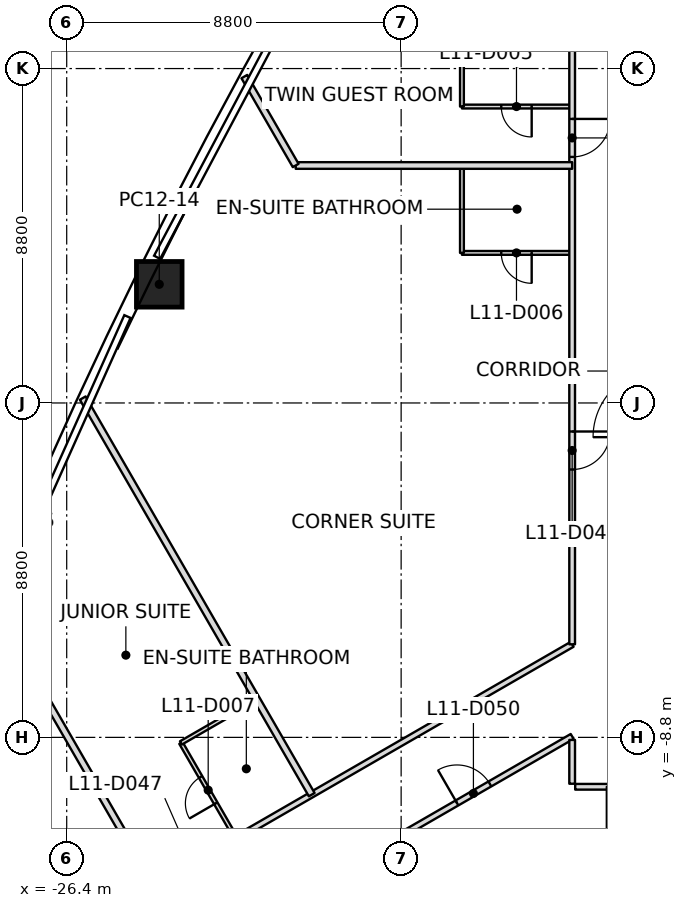
"""IFC4 building model, lengths in metres.
Left out: names, types, materials, properties, quantities, classifications, styles, units other than length and angle.
Written with IfcOpenShell. Run it as: python <this file> out.ifc"""

import sys

from ifc_helpers import new_model, si_unit, direction, frame, frame_2d, origin, origin_2d, place, context, subcontext, project, spatial, rectangle, extrude, element, fill, save


model = new_model("IFC4")
c1 = context("Model", 3, precision=1e-05, world=origin(), true_north=direction((0.0, 1.0)))
c2 = subcontext(c1, "Body", "Model", "MODEL_VIEW")
j1 = project(units=[si_unit("LENGTHUNIT", "METRE"), si_unit("PLANEANGLEUNIT", "RADIAN")], contexts=[c1])
p1 = place(None, origin())
s1 = spatial("IfcSite", under=j1, at=p1, CompositionType="ELEMENT")
p2 = place(p1, origin())
s2 = spatial("IfcBuilding", under=s1, at=p2, CompositionType="ELEMENT")
p3 = place(p2, frame((0.0, 0.0, 62.8)))
s3 = spatial("IfcBuildingStorey", under=s2, at=p3, CompositionType="ELEMENT", Elevation=62.8)
p4 = place(p3, frame((-23.965, 3.122, 0.0), z_axis=(0.015372606146, 0.002309189764, 0.999879168011), x_axis=(0.441716721862, 0.89711079847, -0.008863007202)))
e1 = element("IfcColumn", 1, at=p4, inside=s3, PredefinedType="COLUMN", context=c2, shape_type="SweptSolid", body=[
    extrude(rectangle(XDim=1.2, YDim=1.2, at=origin_2d()), origin(), (0.0, 0.0, 1.0), 3.7),
])
p5 = place(p3, frame((-24.11, -12.707, 0.0), z_axis=(0.0, 0.0, 1.0), x_axis=(-0.500004040168, 0.86602307118, 0.0)))
e2 = element("IfcWall", 2, at=p5, inside=s3, PredefinedType="PARTITIONING", context=c2, shape_type="SweptSolid", body=[
    extrude(rectangle(XDim=8.506, YDim=0.175, at=frame_2d((4.253, 0.0))), origin(), (0.0, 0.0, 1.0), 2.934),
])
p6 = place(p3, frame((-19.953, -10.307, 0.0), z_axis=(0.0, 0.0, 1.0), x_axis=(-0.500011246013, 0.866018910798, 0.0)))
e3 = element("IfcWall", 3, at=p6, inside=s3, PredefinedType="PARTITIONING", context=c2, shape_type="SweptSolid", body=[
    extrude(rectangle(XDim=12.05, YDim=0.175, at=frame_2d((6.025, 0.0))), origin(), (0.0, 0.0, 1.0), 2.934),
])
p7 = place(p3, frame((-13.1, 6.249, 0.0), z_axis=(0.0, 0.0, 1.0), x_axis=(-1.0, 0.0, 0.0)))
e4 = element("IfcWall", 4, at=p7, inside=s3, PredefinedType="PARTITIONING", context=c2, shape_type="SweptSolid", body=[
    extrude(rectangle(XDim=7.274, YDim=0.175, at=frame_2d((3.637, 0.0))), origin(), (0.0, 0.0, 1.0), 3.093),
])
p8 = place(p3, frame((-20.375, 6.249, 0.0), z_axis=(0.0, 0.0, 1.0), x_axis=(-0.50004574482, 0.86599899139, 0.0)))
e5 = element("IfcWall", 5, at=p8, inside=s3, PredefinedType="PARTITIONING", context=c2, shape_type="SweptSolid", body=[
    extrude(rectangle(XDim=2.702, YDim=0.175, at=frame_2d((1.351, 0.0))), origin(), (0.0, 0.0, 1.0), 2.934),
])
p9 = place(p3, frame((-12.1, -10.1, 0.0), z_axis=(0.0, 0.0, 1.0), x_axis=(0.0, -1.0, 0.0)))
e6 = element("IfcWall", 6, at=p9, inside=s3, PredefinedType="PARTITIONING", context=c2, shape_type="SweptSolid", body=[
    extrude(rectangle(XDim=7.608, YDim=0.175, at=frame_2d((3.804, 0.0))), origin(), (0.0, 0.0, 1.0), 3.15),
])
p10 = place(p3, frame((-13.1, -6.351, 0.0), z_axis=(0.0, 0.0, 1.0), x_axis=(-0.866022163861, -0.50000561167, 0.0)))
e7 = element("IfcWall", 7, at=p10, inside=s3, PredefinedType="PARTITIONING", context=c2, shape_type="SweptSolid", body=[
    extrude(rectangle(XDim=12.713, YDim=0.15, at=frame_2d((6.356, 0.0))), origin(), (0.0, 0.0, 1.0), 2.947),
])
p11 = place(p10, frame((11.013, 0.0, 0.0)))
e8 = element("IfcOpeningElement", 8, at=p11, cuts=e7, PredefinedType="OPENING", context=c2, shape_type="SweptSolid", body=[
    extrude(rectangle(XDim=1.0, YDim=2.1, at=frame_2d((0.5, 1.05))), frame((0.0, 0.075, 0.0), z_axis=(0.0, -1.0, 0.0), x_axis=(1.0, 0.0, 0.0)), (0.0, 0.0, 1.0), 0.15),
])
p12 = place(p3, frame((-22.99, -14.486, 0.0), z_axis=(0.0, 0.0, 1.0), x_axis=(0.866025744017, 0.499999410699, 0.0)))
e9 = element("IfcWall", 9, at=p12, inside=s3, PredefinedType="PARTITIONING", context=c2, shape_type="SweptSolid", body=[
    extrude(rectangle(XDim=11.42, YDim=0.15, at=frame_2d((5.71, 0.0))), origin(), (0.0, 0.0, 1.0), 2.797),
])
p13 = place(p12, frame((0.96, 0.0, 0.0)))
e10 = element("IfcOpeningElement", 10, at=p13, cuts=e9, PredefinedType="OPENING", context=c2, shape_type="SweptSolid", body=[
    extrude(rectangle(XDim=1.0, YDim=2.1, at=frame_2d((0.5, 1.05))), frame((0.0, 0.075, 0.0), z_axis=(0.0, -1.0, 0.0), x_axis=(1.0, 0.0, 0.0)), (0.0, 0.0, 1.0), 0.15),
])
p14 = place(p12, frame((7.92, 0.0, 0.0)))
e11 = element("IfcOpeningElement", 11, at=p14, cuts=e9, PredefinedType="OPENING", context=c2, shape_type="SweptSolid", body=[
    extrude(rectangle(XDim=1.0, YDim=2.1, at=frame_2d((0.5, 1.05))), frame((0.0, 0.075, 0.0), z_axis=(0.0, -1.0, 0.0), x_axis=(1.0, 0.0, 0.0)), (0.0, 0.0, 1.0), 0.15),
])
p15 = place(p3, frame((-13.1, -8.867, 0.0), z_axis=(0.0, 0.0, 1.0), x_axis=(0.0, -1.0, 0.0)))
e12 = element("IfcWall", 12, at=p15, inside=s3, PredefinedType="PARTITIONING", context=c2, shape_type="SweptSolid", body=[
    extrude(rectangle(XDim=1.153, YDim=0.15, at=frame_2d((0.576, 0.0))), origin(), (0.0, 0.0, 1.0), 2.797),
])
p16 = place(p3, frame((-13.1, 10.02, 0.0), z_axis=(0.0, 0.0, 1.0), x_axis=(0.0, -1.0, 0.0)))
e13 = element("IfcWall", 13, at=p16, inside=s3, PredefinedType="PARTITIONING", context=c2, shape_type="SweptSolid", body=[
    extrude(rectangle(XDim=16.371, YDim=0.15, at=frame_2d((8.186, 0.0))), origin(), (0.0, 0.0, 1.0), 3.017),
])
p17 = place(p16, frame((2.545, 0.0, 0.0)))
e14 = element("IfcOpeningElement", 14, at=p17, cuts=e13, PredefinedType="OPENING", context=c2, shape_type="SweptSolid", body=[
    extrude(rectangle(XDim=1.0, YDim=2.1, at=frame_2d((0.5, 1.05))), frame((0.0, 0.075, 0.0), z_axis=(0.0, -1.0, 0.0), x_axis=(1.0, 0.0, 0.0)), (0.0, 0.0, 1.0), 0.15),
])
p18 = place(p16, frame((10.771, 0.0, 0.0)))
e15 = element("IfcOpeningElement", 15, at=p18, cuts=e13, PredefinedType="OPENING", context=c2, shape_type="SweptSolid", body=[
    extrude(rectangle(XDim=1.0, YDim=2.1, at=frame_2d((0.5, 1.05))), frame((0.0, 0.075, 0.0), z_axis=(0.0, -1.0, 0.0), x_axis=(1.0, 0.0, 0.0)), (0.0, 0.0, 1.0), 0.15),
])
p19 = place(p3, frame((-13.02, -10.1, 0.0), z_axis=(0.0, 0.0, 1.0), x_axis=(1.0, 0.0, 0.0)))
e16 = element("IfcWall", 16, at=p19, inside=s3, PredefinedType="PARTITIONING", context=c2, shape_type="SweptSolid", body=[
    extrude(rectangle(XDim=26.04, YDim=0.15, at=frame_2d((13.02, 0.0))), origin(), (0.0, 0.0, 1.0), 2.947),
])
p20 = place(p19, frame((4.02, 0.0, 0.0)))
e17 = element("IfcOpeningElement", 17, at=p20, cuts=e16, PredefinedType="OPENING", context=c2, shape_type="SweptSolid", body=[
    extrude(rectangle(XDim=1.0, YDim=2.1, at=frame_2d((0.5, 1.05))), frame((0.0, 0.075, 0.0), z_axis=(0.0, -1.0, 0.0), x_axis=(1.0, 0.0, 0.0)), (0.0, 0.0, 1.0), 0.15),
])
p21 = place(p19, frame((7.02, 0.0, 0.0)))
e18 = element("IfcOpeningElement", 18, at=p21, cuts=e16, PredefinedType="OPENING", context=c2, shape_type="SweptSolid", body=[
    extrude(rectangle(XDim=1.0, YDim=2.1, at=frame_2d((0.5, 1.05))), frame((0.0, 0.075, 0.0), z_axis=(0.0, -1.0, 0.0), x_axis=(1.0, 0.0, 0.0)), (0.0, 0.0, 1.0), 0.15),
])
p22 = place(p19, frame((12.12, 0.0, 0.0)))
e19 = element("IfcOpeningElement", 19, at=p22, cuts=e16, PredefinedType="OPENING", context=c2, shape_type="SweptSolid", body=[
    extrude(rectangle(XDim=1.0, YDim=2.1, at=frame_2d((0.5, 1.05))), frame((0.0, 0.075, 0.0), z_axis=(0.0, -1.0, 0.0), x_axis=(1.0, 0.0, 0.0)), (0.0, 0.0, 1.0), 0.15),
])
p23 = place(p19, frame((16.62, 0.0, 0.0)))
e20 = element("IfcOpeningElement", 20, at=p23, cuts=e16, PredefinedType="OPENING", context=c2, shape_type="SweptSolid", body=[
    extrude(rectangle(XDim=1.0, YDim=2.1, at=frame_2d((0.5, 1.05))), frame((0.0, 0.075, 0.0), z_axis=(0.0, -1.0, 0.0), x_axis=(1.0, 0.0, 0.0)), (0.0, 0.0, 1.0), 0.15),
])
p24 = place(p19, frame((19.62, 0.0, 0.0)))
e21 = element("IfcOpeningElement", 21, at=p24, cuts=e16, PredefinedType="OPENING", context=c2, shape_type="SweptSolid", body=[
    extrude(rectangle(XDim=1.0, YDim=2.1, at=frame_2d((0.5, 1.05))), frame((0.0, 0.075, 0.0), z_axis=(0.0, -1.0, 0.0), x_axis=(1.0, 0.0, 0.0)), (0.0, 0.0, 1.0), 0.15),
])
p25 = place(p3, frame((-21.96, -11.431, 0.0), z_axis=(0.0, 0.0, 1.0), x_axis=(-0.499936001555, 0.866062350151, 0.0)))
e22 = element("IfcWall", 22, at=p25, inside=s3, PredefinedType="PARTITIONING", context=c2, shape_type="SweptSolid", body=[
    extrude(rectangle(XDim=2.87, YDim=0.1, at=frame_2d((1.435, 0.0))), origin(), (0.0, 0.0, 1.0), 3.15),
])
p26 = place(p25, frame((1.035, 0.0, 0.0)))
e23 = element("IfcOpeningElement", 23, at=p26, cuts=e22, PredefinedType="OPENING", context=c2, shape_type="SweptSolid", body=[
    extrude(rectangle(XDim=0.8, YDim=2.1, at=frame_2d((0.4, 1.05))), frame((0.0, 0.05, 0.0), z_axis=(0.0, -1.0, 0.0), x_axis=(1.0, 0.0, 0.0)), (0.0, 0.0, 1.0), 0.1),
])
p27 = place(p3, frame((-23.395, -8.946, 0.0), z_axis=(0.0, 0.0, 1.0), x_axis=(0.866017224141, 0.500014167291, 0.0)))
e24 = element("IfcWall", 24, at=p27, inside=s3, PredefinedType="PARTITIONING", context=c2, shape_type="SweptSolid", body=[
    extrude(rectangle(XDim=2.27, YDim=0.1, at=frame_2d((1.135, 0.0))), origin(), (0.0, 0.0, 1.0), 3.15),
])
p28 = place(p3, frame((-13.13, 3.949, 0.0), z_axis=(0.0, 0.0, 1.0), x_axis=(-1.0, 0.0, 0.0)))
e25 = element("IfcWall", 25, at=p28, inside=s3, PredefinedType="PARTITIONING", context=c2, shape_type="SweptSolid", body=[
    extrude(rectangle(XDim=2.87, YDim=0.1, at=frame_2d((1.435, 0.0))), origin(), (0.0, 0.0, 1.0), 3.093),
])
p29 = place(p28, frame((1.035, 0.0, 0.0)))
e26 = element("IfcOpeningElement", 26, at=p29, cuts=e25, PredefinedType="OPENING", context=c2, shape_type="SweptSolid", body=[
    extrude(rectangle(XDim=0.8, YDim=2.1, at=frame_2d((0.4, 1.05))), frame((0.0, 0.05, 0.0), z_axis=(0.0, -1.0, 0.0), x_axis=(1.0, 0.0, 0.0)), (0.0, 0.0, 1.0), 0.1),
])
p30 = place(p3, frame((-16.0, 3.949, 0.0), z_axis=(0.0, 0.0, 1.0), x_axis=(0.0, 1.0, 0.0)))
e27 = element("IfcWall", 27, at=p30, inside=s3, PredefinedType="PARTITIONING", context=c2, shape_type="SweptSolid", body=[
    extrude(rectangle(XDim=2.27, YDim=0.1, at=frame_2d((1.135, 0.0))), origin(), (0.0, 0.0, 1.0), 3.093),
])
p31 = place(p3, frame((-13.13, 7.8, 0.0), z_axis=(0.0, 0.0, 1.0), x_axis=(-1.0, 0.0, 0.0)))
e28 = element("IfcWall", 28, at=p31, inside=s3, PredefinedType="PARTITIONING", context=c2, shape_type="SweptSolid", body=[
    extrude(rectangle(XDim=2.87, YDim=0.1, at=frame_2d((1.435, 0.0))), origin(), (0.0, 0.0, 1.0), 3.15),
])
p32 = place(p31, frame((1.035, 0.0, 0.0)))
e29 = element("IfcOpeningElement", 29, at=p32, cuts=e28, PredefinedType="OPENING", context=c2, shape_type="SweptSolid", body=[
    extrude(rectangle(XDim=0.8, YDim=2.1, at=frame_2d((0.4, 1.05))), frame((0.0, 0.05, 0.0), z_axis=(0.0, -1.0, 0.0), x_axis=(1.0, 0.0, 0.0)), (0.0, 0.0, 1.0), 0.1),
])
p33 = place(p3, frame((-16.0, 7.8, 0.0), z_axis=(0.0, 0.0, 1.0), x_axis=(0.0, 1.0, 0.0)))
e30 = element("IfcWall", 30, at=p33, inside=s3, PredefinedType="PARTITIONING", context=c2, shape_type="SweptSolid", body=[
    extrude(rectangle(XDim=2.27, YDim=0.1, at=frame_2d((1.135, 0.0))), origin(), (0.0, 0.0, 1.0), 3.15),
])
p34 = place(p17, origin())
e31 = element("IfcDoor", 31, at=p34, inside=s3, OperationType="SINGLE_SWING_LEFT", PredefinedType="DOOR", context=c2, shape_type="SweptSolid", body=[
    extrude(rectangle(XDim=1.0, YDim=2.1, at=frame_2d((0.5, 1.05))), frame((0.0, 0.025, 0.0), z_axis=(0.0, -1.0, 0.0), x_axis=(1.0, 0.0, 0.0)), (0.0, 0.0, 1.0), 0.05),
])
fill(e14, e31)
p35 = place(p32, origin())
e32 = element("IfcDoor", 32, at=p35, inside=s3, OperationType="SINGLE_SWING_RIGHT", PredefinedType="DOOR", context=c2, shape_type="SweptSolid", body=[
    extrude(rectangle(XDim=0.8, YDim=2.1, at=frame_2d((0.4, 1.05))), frame((0.0, 0.025, 0.0), z_axis=(0.0, -1.0, 0.0), x_axis=(1.0, 0.0, 0.0)), (0.0, 0.0, 1.0), 0.05),
])
fill(e29, e32)
p36 = place(p18, origin())
e33 = element("IfcDoor", 33, at=p36, inside=s3, OperationType="SINGLE_SWING_LEFT", PredefinedType="DOOR", context=c2, shape_type="SweptSolid", body=[
    extrude(rectangle(XDim=1.0, YDim=2.1, at=frame_2d((0.5, 1.05))), frame((0.0, 0.025, 0.0), z_axis=(0.0, -1.0, 0.0), x_axis=(1.0, 0.0, 0.0)), (0.0, 0.0, 1.0), 0.05),
])
fill(e15, e33)
p37 = place(p29, origin())
e34 = element("IfcDoor", 34, at=p37, inside=s3, OperationType="SINGLE_SWING_LEFT", PredefinedType="DOOR", context=c2, shape_type="SweptSolid", body=[
    extrude(rectangle(XDim=0.8, YDim=2.1, at=frame_2d((0.4, 1.05))), frame((0.0, 0.025, 0.0), z_axis=(0.0, -1.0, 0.0), x_axis=(1.0, 0.0, 0.0)), (0.0, 0.0, 1.0), 0.05),
])
fill(e26, e34)
p38 = place(p26, origin())
e35 = element("IfcDoor", 35, at=p38, inside=s3, OperationType="SINGLE_SWING_LEFT", PredefinedType="DOOR", context=c2, shape_type="SweptSolid", body=[
    extrude(rectangle(XDim=0.8, YDim=2.1, at=frame_2d((0.4, 1.05))), frame((0.0, 0.025, 0.0), z_axis=(0.0, -1.0, 0.0), x_axis=(1.0, 0.0, 0.0)), (0.0, 0.0, 1.0), 0.05),
])
fill(e23, e35)
p39 = place(p14, origin())
e36 = element("IfcDoor", 36, at=p39, inside=s3, OperationType="SINGLE_SWING_LEFT", PredefinedType="DOOR", context=c2, shape_type="SweptSolid", body=[
    extrude(rectangle(XDim=1.0, YDim=2.1, at=frame_2d((0.5, 1.05))), frame((0.0, 0.025, 0.0), z_axis=(0.0, -1.0, 0.0), x_axis=(1.0, 0.0, 0.0)), (0.0, 0.0, 1.0), 0.05),
])
fill(e11, e36)
save(model, sys.argv[1])
